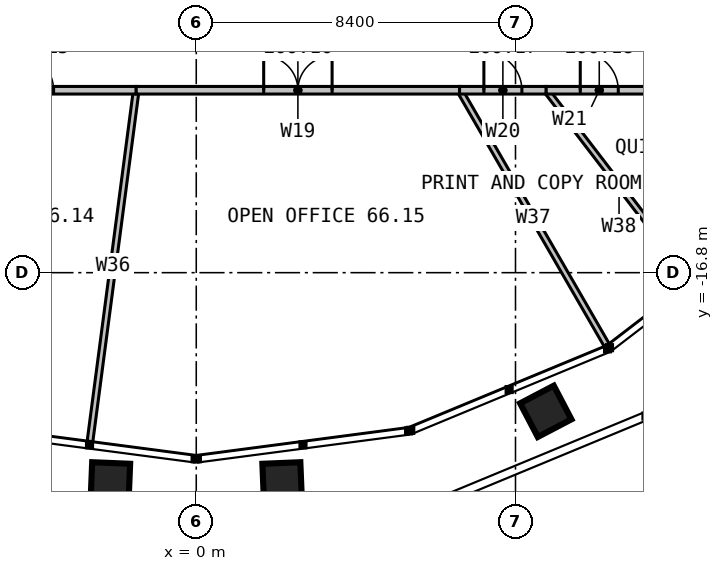
"""IFC4 building model, lengths in metres.
Left out: names, types, materials, properties, quantities, classifications, styles, units other than length and angle.
Written with IfcOpenShell. Run it as: python <this file> out.ifc"""

import sys

from ifc_helpers import new_model, si_unit, direction, frame, frame_2d, origin, place, context, subcontext, project, spatial, rectangle, extrude, element, fill, save


model = new_model("IFC4")
c1 = context("Model", 3, precision=1e-05, world=origin(), true_north=direction((0.0, 1.0)))
c2 = subcontext(c1, "Body", "Model", "MODEL_VIEW")
j1 = project(units=[si_unit("LENGTHUNIT", "METRE"), si_unit("PLANEANGLEUNIT", "RADIAN")], contexts=[c1])
p1 = place(None, origin())
s1 = spatial("IfcSite", under=j1, at=p1, CompositionType="ELEMENT")
p2 = place(p1, origin())
s2 = spatial("IfcBuilding", under=s1, at=p2, CompositionType="ELEMENT")
p3 = place(p2, frame((0.0, 0.0, 272.0)))
s3 = spatial("IfcBuildingStorey", under=s2, at=p3, CompositionType="ELEMENT", Elevation=272.0)
p4 = place(p3, frame((-1.58, -12.0, 0.0), z_axis=(0.0, 0.0, 1.0), x_axis=(-0.13053515118, -0.991443681863, 0.0)))
e1 = element("IfcWall", 1, at=p4, inside=s3, PredefinedType="PARTITIONING", context=c2, shape_type="SweptSolid", body=[
    extrude(rectangle(XDim=9.32, YDim=0.15, at=frame_2d((4.66, 0.0))), origin(), (0.0, 0.0, 1.0), 2.79),
])
p5 = place(p3, frame((6.928, -12.0, 0.0), z_axis=(0.0, 0.0, 1.0), x_axis=(0.500000526688, -0.866025099701, 0.0)))
e2 = element("IfcWall", 2, at=p5, inside=s3, PredefinedType="PARTITIONING", context=c2, shape_type="SweptSolid", body=[
    extrude(rectangle(XDim=7.752, YDim=0.15, at=frame_2d((3.876, 0.0))), origin(), (0.0, 0.0, 1.0), 2.79),
])
p6 = place(p3, frame((9.208, -12.0, 0.0), z_axis=(0.0, 0.0, 1.0), x_axis=(0.608752966797, -0.793359833503, 0.0)))
e3 = element("IfcWall", 3, at=p6, inside=s3, PredefinedType="PARTITIONING", context=c2, shape_type="SweptSolid", body=[
    extrude(rectangle(XDim=6.298, YDim=0.15, at=frame_2d((3.149, 0.0))), origin(), (0.0, 0.0, 1.0), 2.79),
])
p7 = place(p3, frame((-6.928, -12.0, 0.0), z_axis=(0.0, 0.0, 1.0), x_axis=(1.0, 0.0, 0.0)))
e4 = element("IfcWall", 4, at=p7, inside=s3, PredefinedType="PARTITIONING", context=c2, shape_type="SweptSolid", body=[
    extrude(rectangle(XDim=5.348, YDim=0.2, at=frame_2d((2.674, 0.0))), origin(), (0.0, 0.0, 1.0), 3.8),
])
p8 = place(p7, frame((2.174, 0.0, 0.0)))
e5 = element("IfcOpeningElement", 5, at=p8, cuts=e4, PredefinedType="OPENING", context=c2, shape_type="SweptSolid", body=[
    extrude(rectangle(XDim=1.0, YDim=2.2, at=frame_2d((0.5, 1.1))), frame((0.0, 0.11, 0.0), z_axis=(0.0, -1.0, 0.0), x_axis=(1.0, 0.0, 0.0)), (0.0, 0.0, 1.0), 0.22),
])
p9 = place(p3, frame((-1.58, -12.0, 0.0), z_axis=(0.0, 0.0, 1.0), x_axis=(1.0, 0.0, 0.0)))
e6 = element("IfcWall", 6, at=p9, inside=s3, PredefinedType="PARTITIONING", context=c2, shape_type="SweptSolid", body=[
    extrude(rectangle(XDim=8.508, YDim=0.2, at=frame_2d((4.254, 0.0))), origin(), (0.0, 0.0, 1.0), 3.8),
])
p10 = place(p9, frame((3.354, 0.0, 0.0)))
e7 = element("IfcOpeningElement", 7, at=p10, cuts=e6, PredefinedType="OPENING", context=c2, shape_type="SweptSolid", body=[
    extrude(rectangle(XDim=1.8, YDim=2.2, at=frame_2d((0.9, 1.1))), frame((0.0, 0.11, 0.0), z_axis=(0.0, -1.0, 0.0), x_axis=(1.0, 0.0, 0.0)), (0.0, 0.0, 1.0), 0.22),
])
p11 = place(p3, frame((6.928, -12.0, 0.0), z_axis=(0.0, 0.0, 1.0), x_axis=(1.0, 0.0, 0.0)))
e8 = element("IfcWall", 8, at=p11, inside=s3, PredefinedType="PARTITIONING", context=c2, shape_type="SweptSolid", body=[
    extrude(rectangle(XDim=2.28, YDim=0.2, at=frame_2d((1.14, 0.0))), origin(), (0.0, 0.0, 1.0), 3.8),
])
p12 = place(p11, frame((0.64, 0.0, 0.0)))
e9 = element("IfcOpeningElement", 9, at=p12, cuts=e8, PredefinedType="OPENING", context=c2, shape_type="SweptSolid", body=[
    extrude(rectangle(XDim=1.0, YDim=2.2, at=frame_2d((0.5, 1.1))), frame((0.0, 0.11, 0.0), z_axis=(0.0, -1.0, 0.0), x_axis=(1.0, 0.0, 0.0)), (0.0, 0.0, 1.0), 0.22),
])
p13 = place(p3, frame((9.208, -12.0, 0.0), z_axis=(0.0, 0.0, 1.0), x_axis=(1.0, 0.0, 0.0)))
e10 = element("IfcWall", 10, at=p13, inside=s3, PredefinedType="PARTITIONING", context=c2, shape_type="SweptSolid", body=[
    extrude(rectangle(XDim=2.792, YDim=0.2, at=frame_2d((1.396, 0.0))), origin(), (0.0, 0.0, 1.0), 3.8),
])
p14 = place(p13, frame((0.896, 0.0, 0.0)))
e11 = element("IfcOpeningElement", 11, at=p14, cuts=e10, PredefinedType="OPENING", context=c2, shape_type="SweptSolid", body=[
    extrude(rectangle(XDim=1.0, YDim=2.2, at=frame_2d((0.5, 1.1))), frame((0.0, 0.11, 0.0), z_axis=(0.0, -1.0, 0.0), x_axis=(1.0, 0.0, 0.0)), (0.0, 0.0, 1.0), 0.22),
])
p15 = place(p8, origin())
e12 = element("IfcDoor", 12, at=p15, inside=s3, OperationType="SINGLE_SWING_LEFT", PredefinedType="DOOR", context=c2, shape_type="SweptSolid", body=[
    extrude(rectangle(XDim=1.0, YDim=2.2, at=frame_2d((0.5, 1.1))), frame((0.0, 0.025, 0.0), z_axis=(0.0, -1.0, 0.0), x_axis=(1.0, 0.0, 0.0)), (0.0, 0.0, 1.0), 0.05),
])
fill(e5, e12)
p16 = place(p10, origin())
e13 = element("IfcDoor", 13, at=p16, inside=s3, OperationType="DOUBLE_DOOR_SINGLE_SWING", PredefinedType="DOOR", context=c2, shape_type="SweptSolid", body=[
    extrude(rectangle(XDim=1.8, YDim=2.2, at=frame_2d((0.9, 1.1))), frame((0.0, 0.025, 0.0), z_axis=(0.0, -1.0, 0.0), x_axis=(1.0, 0.0, 0.0)), (0.0, 0.0, 1.0), 0.05),
])
fill(e7, e13)
p17 = place(p12, origin())
e14 = element("IfcDoor", 14, at=p17, inside=s3, OperationType="SINGLE_SWING_LEFT", PredefinedType="DOOR", context=c2, shape_type="SweptSolid", body=[
    extrude(rectangle(XDim=1.0, YDim=2.2, at=frame_2d((0.5, 1.1))), frame((0.0, 0.025, 0.0), z_axis=(0.0, -1.0, 0.0), x_axis=(1.0, 0.0, 0.0)), (0.0, 0.0, 1.0), 0.05),
])
fill(e9, e14)
p18 = place(p14, origin())
e15 = element("IfcDoor", 15, at=p18, inside=s3, OperationType="SINGLE_SWING_LEFT", PredefinedType="DOOR", context=c2, shape_type="SweptSolid", body=[
    extrude(rectangle(XDim=1.0, YDim=2.2, at=frame_2d((0.5, 1.1))), frame((0.0, 0.025, 0.0), z_axis=(0.0, -1.0, 0.0), x_axis=(1.0, 0.0, 0.0)), (0.0, 0.0, 1.0), 0.05),
])
fill(e11, e15)
save(model, sys.argv[1])
